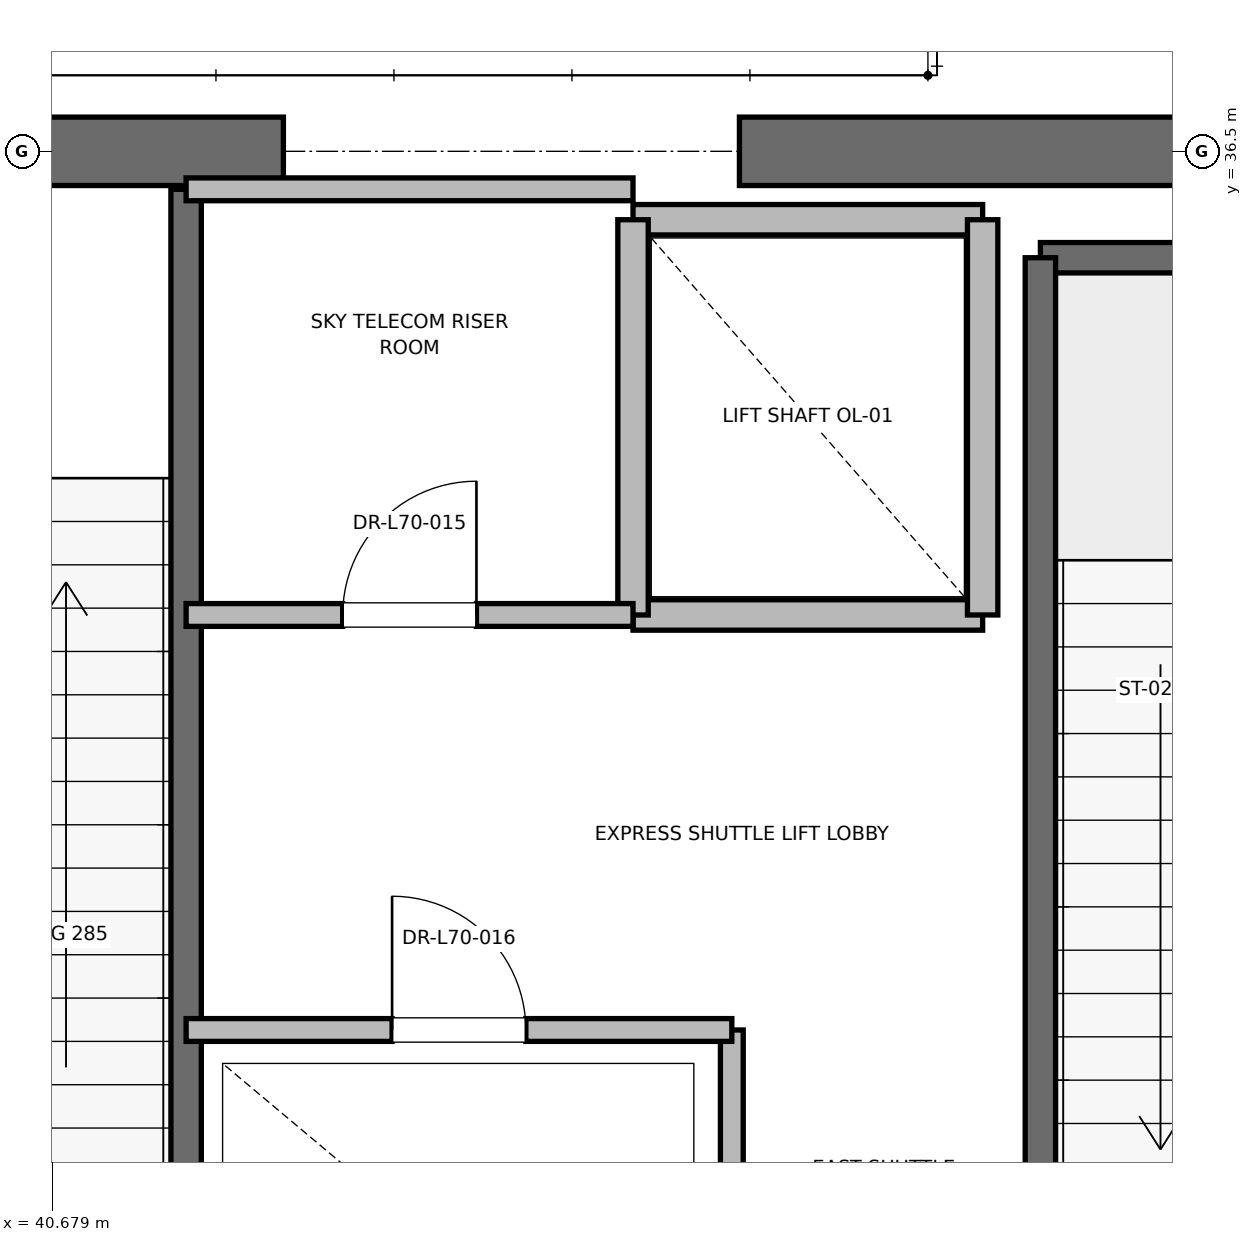
"""IFC4 building model, lengths in metres.
Left out: names, types, materials, properties, quantities, classifications, styles, units other than length and angle.
Written with IfcOpenShell. Run it as: python <this file> out.ifc"""

import sys

from ifc_helpers import new_model, si_unit, direction, frame, frame_2d, origin, place, context, subcontext, project, spatial, rectangle, extrude, element, fill, save


model = new_model("IFC4")
c1 = context("Model", 3, precision=1e-05, world=origin(), true_north=direction((0.0, 1.0)))
c2 = subcontext(c1, "Body", "Model", "MODEL_VIEW")
j1 = project(units=[si_unit("LENGTHUNIT", "METRE"), si_unit("PLANEANGLEUNIT", "RADIAN")], contexts=[c1])
p1 = place(None, origin())
s1 = spatial("IfcSite", under=j1, at=p1, CompositionType="ELEMENT")
p2 = place(p1, origin())
s2 = spatial("IfcBuilding", under=s1, at=p2, CompositionType="ELEMENT")
p3 = place(p2, frame((0.0, 0.0, 301.0)))
s3 = spatial("IfcBuildingStorey", under=s2, at=p3, CompositionType="ELEMENT", Elevation=301.0)
p4 = place(p3, frame((37.8, 36.5, 0.0), z_axis=(0.0, 0.0, 1.0), x_axis=(1.0, 0.0, 0.0)))
e1 = element("IfcWall", 1, at=p4, inside=s3, PredefinedType="SHEAR", context=c2, shape_type="SweptSolid", body=[
    extrude(rectangle(XDim=4.4, YDim=0.45, at=frame_2d((2.2, 0.0))), origin(), (0.0, 0.0, 1.0), 5.585),
])
p5 = place(p4, frame((1.65, 0.0, 0.0)))
e2 = element("IfcOpeningElement", 2, at=p5, cuts=e1, PredefinedType="OPENING", context=c2, shape_type="SweptSolid", body=[
    extrude(rectangle(XDim=1.1, YDim=2.15, at=frame_2d((0.55, 1.075))), frame((0.0, 0.225, 0.0), z_axis=(0.0, -1.0, 0.0), x_axis=(1.0, 0.0, 0.0)), (0.0, 0.0, 1.0), 0.45),
])
p6 = place(p3, frame((45.2, 36.5, 0.0), z_axis=(0.0, 0.0, 1.0), x_axis=(1.0, 0.0, 0.0)))
e3 = element("IfcWall", 3, at=p6, inside=s3, PredefinedType="SHEAR", context=c2, shape_type="SweptSolid", body=[
    extrude(rectangle(XDim=5.8, YDim=0.45, at=frame_2d((2.9, 0.0))), origin(), (0.0, 0.0, 1.0), 5.585),
])
p7 = place(p3, frame((47.18, 35.8, 0.0), z_axis=(0.0, 0.0, 1.0), x_axis=(1.0, 0.0, 0.0)))
e4 = element("IfcWall", 4, at=p7, inside=s3, PredefinedType="SOLIDWALL", context=c2, shape_type="SweptSolid", body=[
    extrude(rectangle(XDim=3.12, YDim=0.2, at=frame_2d((1.56, 0.0))), origin(), (0.0, 0.0, 1.0), 5.585),
])
p8 = place(p3, frame((47.18, 27.62, 0.0), z_axis=(0.0, 0.0, 1.0), x_axis=(0.0, 1.0, 0.0)))
e5 = element("IfcWall", 5, at=p8, inside=s3, PredefinedType="SOLIDWALL", context=c2, shape_type="SweptSolid", body=[
    extrude(rectangle(XDim=8.18, YDim=0.2, at=frame_2d((4.09, 0.0))), origin(), (0.0, 0.0, 1.0), 5.585),
])
p9 = place(p3, frame((41.56, 27.68, 0.0), z_axis=(0.0, 0.0, 1.0), x_axis=(0.0, 1.0, 0.0)))
e6 = element("IfcWall", 6, at=p9, inside=s3, PredefinedType="SOLIDWALL", context=c2, shape_type="SweptSolid", body=[
    extrude(rectangle(XDim=8.57, YDim=0.2, at=frame_2d((4.285, 0.0))), origin(), (0.0, 0.0, 1.0), 5.585),
])
p10 = place(p3, frame((44.5, 33.45, 0.0), z_axis=(0.0, 0.0, 1.0), x_axis=(1.0, 0.0, 0.0)))
e7 = element("IfcWall", 7, at=p10, inside=s3, PredefinedType="SOLIDWALL", context=c2, shape_type="SweptSolid", body=[
    extrude(rectangle(XDim=2.3, YDim=0.2, at=frame_2d((1.15, 0.0))), origin(), (0.0, 0.0, 1.0), 5.585),
])
p11 = place(p3, frame((46.8, 36.05, 0.0), z_axis=(0.0, 0.0, 1.0), x_axis=(-1.0, 0.0, 0.0)))
e8 = element("IfcWall", 8, at=p11, inside=s3, PredefinedType="SOLIDWALL", context=c2, shape_type="SweptSolid", body=[
    extrude(rectangle(XDim=2.3, YDim=0.2, at=frame_2d((1.15, 0.0))), origin(), (0.0, 0.0, 1.0), 4.665),
])
p12 = place(p3, frame((44.5, 36.05, 0.0), z_axis=(0.0, 0.0, 1.0), x_axis=(0.0, -1.0, 0.0)))
e9 = element("IfcWall", 9, at=p12, inside=s3, PredefinedType="SOLIDWALL", context=c2, shape_type="SweptSolid", body=[
    extrude(rectangle(XDim=2.6, YDim=0.2, at=frame_2d((1.3, 0.0))), origin(), (0.0, 0.0, 1.0), 4.665),
])
p13 = place(p3, frame((46.8, 33.45, 0.0), z_axis=(0.0, 0.0, 1.0), x_axis=(0.0, 1.0, 0.0)))
e10 = element("IfcWall", 10, at=p13, inside=s3, PredefinedType="SOLIDWALL", context=c2, shape_type="SweptSolid", body=[
    extrude(rectangle(XDim=2.6, YDim=0.2, at=frame_2d((1.3, 0.0))), origin(), (0.0, 0.0, 1.0), 5.585),
])
p14 = place(p3, frame((45.15, 27.62, 0.0), z_axis=(0.0, 0.0, 1.0), x_axis=(0.0, 1.0, 0.0)))
e11 = element("IfcWall", 11, at=p14, inside=s3, PredefinedType="PARTITIONING", context=c2, shape_type="SweptSolid", body=[
    extrude(rectangle(XDim=3.1, YDim=0.15, at=frame_2d((1.55, 0.0))), origin(), (0.0, 0.0, 1.0), 2.85),
])
p15 = place(p3, frame((41.56, 30.72, 0.0), z_axis=(0.0, 0.0, 1.0), x_axis=(1.0, 0.0, 0.0)))
e12 = element("IfcWall", 12, at=p15, inside=s3, PredefinedType="PARTITIONING", context=c2, shape_type="SweptSolid", body=[
    extrude(rectangle(XDim=3.59, YDim=0.15, at=frame_2d((1.795, 0.0))), origin(), (0.0, 0.0, 1.0), 2.85),
])
p16 = place(p15, frame((1.355, 0.0, 0.0)))
e13 = element("IfcOpeningElement", 13, at=p16, cuts=e12, PredefinedType="OPENING", context=c2, shape_type="SweptSolid", body=[
    extrude(rectangle(XDim=0.88, YDim=2.1, at=frame_2d((0.44, 1.05))), frame((0.0, 0.075, 0.0), z_axis=(0.0, -1.0, 0.0), x_axis=(1.0, 0.0, 0.0)), (0.0, 0.0, 1.0), 0.15),
])
p17 = place(p3, frame((41.56, 36.25, 0.0), z_axis=(0.0, 0.0, 1.0), x_axis=(1.0, 0.0, 0.0)))
e14 = element("IfcWall", 14, at=p17, inside=s3, PredefinedType="PARTITIONING", context=c2, shape_type="SweptSolid", body=[
    extrude(rectangle(XDim=2.94, YDim=0.15, at=frame_2d((1.47, 0.0))), origin(), (0.0, 0.0, 1.0), 2.85),
])
p18 = place(p3, frame((41.56, 33.45, 0.0), z_axis=(0.0, 0.0, 1.0), x_axis=(1.0, 0.0, 0.0)))
e15 = element("IfcWall", 15, at=p18, inside=s3, PredefinedType="PARTITIONING", context=c2, shape_type="SweptSolid", body=[
    extrude(rectangle(XDim=2.94, YDim=0.15, at=frame_2d((1.47, 0.0))), origin(), (0.0, 0.0, 1.0), 2.85),
])
p19 = place(p18, frame((1.03, 0.0, 0.0)))
e16 = element("IfcOpeningElement", 16, at=p19, cuts=e15, PredefinedType="OPENING", context=c2, shape_type="SweptSolid", body=[
    extrude(rectangle(XDim=0.88, YDim=2.1, at=frame_2d((0.44, 1.05))), frame((0.0, 0.075, 0.0), z_axis=(0.0, -1.0, 0.0), x_axis=(1.0, 0.0, 0.0)), (0.0, 0.0, 1.0), 0.15),
])
p20 = place(p16, origin())
e17 = element("IfcDoor", 17, at=p20, inside=s3, OperationType="SINGLE_SWING_LEFT", PredefinedType="DOOR", context=c2, shape_type="SweptSolid", body=[
    extrude(rectangle(XDim=0.88, YDim=2.1, at=frame_2d((0.44, 1.05))), frame((0.0, 0.025, 0.0), z_axis=(0.0, -1.0, 0.0), x_axis=(1.0, 0.0, 0.0)), (0.0, 0.0, 1.0), 0.05),
])
fill(e13, e17)
p21 = place(p19, origin())
e18 = element("IfcDoor", 18, at=p21, inside=s3, OperationType="SINGLE_SWING_RIGHT", PredefinedType="DOOR", context=c2, shape_type="SweptSolid", body=[
    extrude(rectangle(XDim=0.88, YDim=2.1, at=frame_2d((0.44, 1.05))), frame((0.0, 0.025, 0.0), z_axis=(0.0, -1.0, 0.0), x_axis=(1.0, 0.0, 0.0)), (0.0, 0.0, 1.0), 0.05),
])
fill(e16, e18)
save(model, sys.argv[1])
